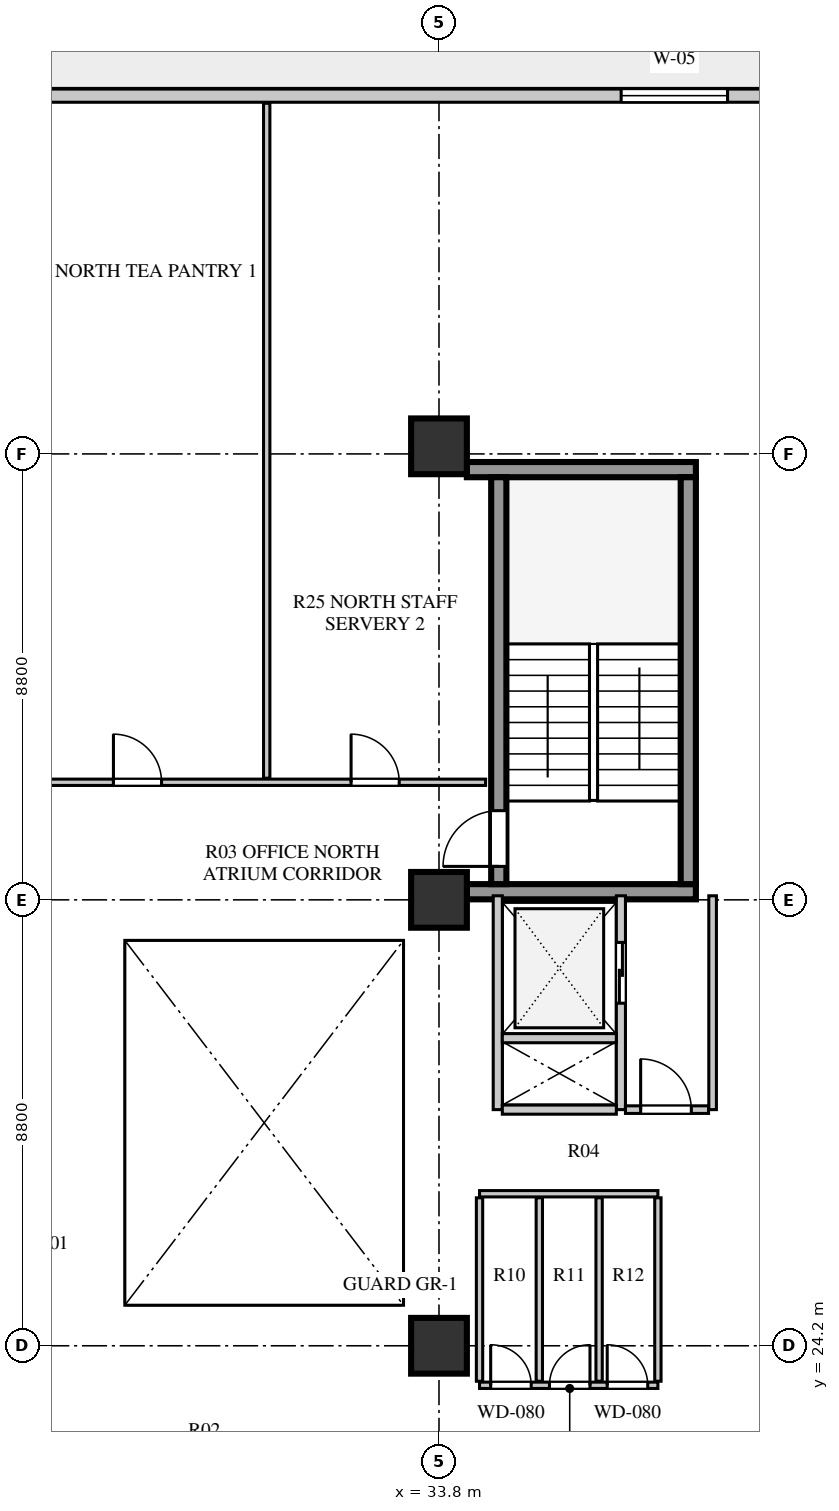
"""IFC4 building model, lengths in metres.
Left out: names, types, materials, properties, quantities, classifications, styles, units other than length and angle.
Written with IfcOpenShell. Run it as: python <this file> out.ifc"""

import sys

from ifc_helpers import new_model, si_unit, direction, frame, frame_2d, origin, origin_2d, place, context, subcontext, project, spatial, rectangle, extrude, element, fill, save


model = new_model("IFC4")
c1 = context("Model", 3, precision=1e-05, world=origin(), true_north=direction((0.0, 1.0)))
c2 = subcontext(c1, "Body", "Model", "MODEL_VIEW")
j1 = project(units=[si_unit("LENGTHUNIT", "METRE"), si_unit("PLANEANGLEUNIT", "RADIAN")], contexts=[c1])
p1 = place(None, origin())
s1 = spatial("IfcSite", under=j1, at=p1, CompositionType="ELEMENT")
p2 = place(p1, origin())
s2 = spatial("IfcBuilding", under=s1, at=p2, CompositionType="ELEMENT")
p3 = place(p2, frame((0.0, 0.0, 90.0)))
s3 = spatial("IfcBuildingStorey", under=s2, at=p3, CompositionType="ELEMENT", Elevation=90.0)
for number, where, z_axis, x_axis in (
    (1, (34.35, 33.16, 0.0), (0.0, 0.0, 1.0), (1.0, 0.0, 0.0)),
    (2, (34.35, 41.49, 0.0), (0.0, 0.0, 1.0), (1.0, 0.0, 0.0)),
):
    element("IfcWall", number, at=place(p3, frame(where, z_axis=z_axis, x_axis=x_axis)), inside=s3, PredefinedType="SHEAR", context=c2, shape_type="SweptSolid", body=[
        extrude(rectangle(XDim=4.52, YDim=0.3, at=frame_2d((2.26, 0.0))), origin(), (0.0, 0.0, 1.0), 3.7),
    ])
p4 = place(p3, frame((34.98, 33.31, 0.0), z_axis=(0.0, 0.0, 1.0), x_axis=(0.0, 1.0, 0.0)))
e3 = element("IfcWall", 3, at=p4, inside=s3, PredefinedType="SHEAR", context=c2, shape_type="SweptSolid", body=[
    extrude(rectangle(XDim=8.03, YDim=0.3, at=frame_2d((4.015, 0.0))), origin(), (0.0, 0.0, 1.0), 3.7),
])
p5 = place(p4, frame((0.35, 0.0, 0.0)))
e4 = element("IfcOpeningElement", 4, at=p5, cuts=e3, PredefinedType="OPENING", context=c2, shape_type="SweptSolid", body=[
    extrude(rectangle(XDim=1.1, YDim=2.1, at=frame_2d((0.55, 1.05))), frame((0.0, 0.16, 0.0), z_axis=(0.0, -1.0, 0.0), x_axis=(1.0, 0.0, 0.0)), (0.0, 0.0, 1.0), 0.32),
])
p6 = place(p3, frame((38.72, 33.31, 0.0), z_axis=(0.0, 0.0, 1.0), x_axis=(0.0, 1.0, 0.0)))
e5 = element("IfcWall", 5, at=p6, inside=s3, PredefinedType="SHEAR", context=c2, shape_type="SweptSolid", body=[
    extrude(rectangle(XDim=8.03, YDim=0.3, at=frame_2d((4.015, 0.0))), origin(), (0.0, 0.0, 1.0), 3.7),
])
for number, where, z_axis, x_axis in (
    (6, (33.8, 24.2, 0.0), (0.0, 0.0, 1.0), (1.0, 0.0, 0.0)),
    (7, (33.8, 33.0, 0.0), (0.0, 0.0, 1.0), (1.0, 0.0, 0.0)),
    (8, (33.8, 41.95, 0.0), (0.0, 0.0, 1.0), (1.0, 0.0, 0.0)),
):
    element("IfcColumn", number, at=place(p3, frame(where, z_axis=z_axis, x_axis=x_axis)), inside=s3, PredefinedType="COLUMN", context=c2, shape_type="SweptSolid", body=[
        extrude(rectangle(XDim=1.1, YDim=1.1, at=origin_2d()), origin(), (0.0, 0.0, 1.0), 3.7),
    ])
p7 = place(p3, frame((46.6, 48.87, 0.0), z_axis=(0.0, 0.0, 1.0), x_axis=(-1.0, 0.0, 0.0)))
e9 = element("IfcWall", 9, at=p7, inside=s3, PredefinedType="SOLIDWALL", context=c2, shape_type="SweptSolid", body=[
    extrude(rectangle(XDim=34.6, YDim=0.26, at=frame_2d((17.3, 0.0))), origin(), (0.0, 0.0, 1.0), 3.7),
])
p8 = place(p7, frame((32.65, 0.0, 0.0)))
e10 = element("IfcOpeningElement", 10, at=p8, cuts=e9, PredefinedType="OPENING", context=c2, shape_type="SweptSolid", body=[
    extrude(rectangle(XDim=1.0, YDim=2.05, at=frame_2d((0.5, 1.025))), frame((0.0, 0.14, 0.0), z_axis=(0.0, -1.0, 0.0), x_axis=(1.0, 0.0, 0.0)), (0.0, 0.0, 1.0), 0.28),
])
p9 = place(p7, frame((23.37, 0.0, 0.8)))
e11 = element("IfcOpeningElement", 11, at=p9, cuts=e9, PredefinedType="OPENING", context=c2, shape_type="SweptSolid", body=[
    extrude(rectangle(XDim=2.4, YDim=2.05, at=frame_2d((1.2, 1.025))), frame((0.0, 0.14, 0.0), z_axis=(0.0, -1.0, 0.0), x_axis=(1.0, 0.0, 0.0)), (0.0, 0.0, 1.0), 0.28),
])
p10 = place(p7, frame((7.105, 0.0, 0.8)))
e12 = element("IfcOpeningElement", 12, at=p10, cuts=e9, PredefinedType="OPENING", context=c2, shape_type="SweptSolid", body=[
    extrude(rectangle(XDim=2.1, YDim=1.95, at=frame_2d((1.05, 0.975))), frame((0.0, 0.14, 0.0), z_axis=(0.0, -1.0, 0.0), x_axis=(1.0, 0.0, 0.0)), (0.0, 0.0, 1.0), 0.28),
])
p11 = place(p3, frame((34.96, 28.86, 0.0), z_axis=(0.0, 0.0, 1.0), x_axis=(0.0, 1.0, 0.0)))
e13 = element("IfcWall", 13, at=p11, inside=s3, PredefinedType="SOLIDWALL", context=c2, shape_type="SweptSolid", body=[
    extrude(rectangle(XDim=4.22, YDim=0.18, at=frame_2d((2.11, 0.0))), origin(), (0.0, 0.0, 1.0), 3.7),
])
p12 = place(p3, frame((37.39, 28.86, 0.0), z_axis=(0.0, 0.0, 1.0), x_axis=(0.0, 1.0, 0.0)))
e14 = element("IfcWall", 14, at=p12, inside=s3, PredefinedType="SOLIDWALL", context=c2, shape_type="SweptSolid", body=[
    extrude(rectangle(XDim=4.22, YDim=0.18, at=frame_2d((2.11, 0.0))), origin(), (0.0, 0.0, 1.0), 3.7),
])
p13 = place(p12, frame((2.1, 0.0, 0.0)))
e15 = element("IfcOpeningElement", 15, at=p13, cuts=e14, PredefinedType="OPENING", context=c2, shape_type="SweptSolid", body=[
    extrude(rectangle(XDim=1.2, YDim=2.12, at=frame_2d((0.6, 1.06))), frame((0.0, 0.1, 0.0), z_axis=(0.0, -1.0, 0.0), x_axis=(1.0, 0.0, 0.0)), (0.0, 0.0, 1.0), 0.2),
])
for number, where, z_axis, x_axis in (
    (16, (35.05, 28.86, 0.0), (0.0, 0.0, 1.0), (1.0, 0.0, 0.0)),
    (17, (35.05, 30.27, 0.0), (0.0, 0.0, 1.0), (1.0, 0.0, 0.0)),
):
    element("IfcWall", number, at=place(p3, frame(where, z_axis=z_axis, x_axis=x_axis)), inside=s3, PredefinedType="SOLIDWALL", context=c2, shape_type="SweptSolid", body=[
        extrude(rectangle(XDim=2.25, YDim=0.18, at=frame_2d((1.125, 0.0))), origin(), (0.0, 0.0, 1.0), 3.7),
    ])
p14 = place(p3, frame((39.2, 28.86, 0.0), z_axis=(0.0, 0.0, 1.0), x_axis=(0.0, 1.0, 0.0)))
e18 = element("IfcWall", 18, at=p14, inside=s3, PredefinedType="PARTITIONING", context=c2, shape_type="SweptSolid", body=[
    extrude(rectangle(XDim=4.22, YDim=0.15, at=frame_2d((2.11, 0.0))), origin(), (0.0, 0.0, 1.0), 3.7),
])
p15 = place(p3, frame((37.48, 28.86, 0.0), z_axis=(0.0, 0.0, 1.0), x_axis=(1.0, 0.0, 0.0)))
e19 = element("IfcWall", 19, at=p15, inside=s3, PredefinedType="PARTITIONING", context=c2, shape_type="SweptSolid", body=[
    extrude(rectangle(XDim=1.64, YDim=0.15, at=frame_2d((0.82, 0.0))), origin(), (0.0, 0.0, 1.0), 3.7),
])
p16 = place(p15, frame((0.3, 0.0, 0.0)))
e20 = element("IfcOpeningElement", 20, at=p16, cuts=e19, PredefinedType="OPENING", context=c2, shape_type="SweptSolid", body=[
    extrude(rectangle(XDim=1.0, YDim=2.1, at=frame_2d((0.5, 1.05))), frame((0.0, 0.085, 0.0), z_axis=(0.0, -1.0, 0.0), x_axis=(1.0, 0.0, 0.0)), (0.0, 0.0, 1.0), 0.17),
])
p17 = place(p3, frame((34.6, 23.42, 0.0), z_axis=(0.0, 0.0, 1.0), x_axis=(1.0, 0.0, 0.0)))
e21 = element("IfcWall", 21, at=p17, inside=s3, PredefinedType="PLUMBINGWALL", context=c2, shape_type="SweptSolid", body=[
    extrude(rectangle(XDim=3.52, YDim=0.125, at=frame_2d((1.76, 0.0))), origin(), (0.0, 0.0, 1.0), 3.7),
])
p18 = place(p17, frame((0.22, 0.0, 0.0)))
e22 = element("IfcOpeningElement", 22, at=p18, cuts=e21, PredefinedType="OPENING", context=c2, shape_type="SweptSolid", body=[
    extrude(rectangle(XDim=0.8, YDim=2.05, at=frame_2d((0.4, 1.025))), frame((0.0, 0.073, 0.0), z_axis=(0.0, -1.0, 0.0), x_axis=(1.0, 0.0, 0.0)), (0.0, 0.0, 1.0), 0.145),
])
p19 = place(p17, frame((1.38, 0.0, 0.0)))
e23 = element("IfcOpeningElement", 23, at=p19, cuts=e21, PredefinedType="OPENING", context=c2, shape_type="SweptSolid", body=[
    extrude(rectangle(XDim=0.8, YDim=2.05, at=frame_2d((0.4, 1.025))), frame((0.0, 0.073, 0.0), z_axis=(0.0, -1.0, 0.0), x_axis=(1.0, 0.0, 0.0)), (0.0, 0.0, 1.0), 0.145),
])
p20 = place(p17, frame((2.52, 0.0, 0.0)))
e24 = element("IfcOpeningElement", 24, at=p20, cuts=e21, PredefinedType="OPENING", context=c2, shape_type="SweptSolid", body=[
    extrude(rectangle(XDim=0.8, YDim=2.05, at=frame_2d((0.4, 1.025))), frame((0.0, 0.073, 0.0), z_axis=(0.0, -1.0, 0.0), x_axis=(1.0, 0.0, 0.0)), (0.0, 0.0, 1.0), 0.145),
])
p21 = place(p3, frame((25.25, 35.32, 0.0), z_axis=(0.0, 0.0, 1.0), x_axis=(1.0, 0.0, 0.0)))
e25 = element("IfcWall", 25, at=p21, inside=s3, PredefinedType="PLUMBINGWALL", context=c2, shape_type="SweptSolid", body=[
    extrude(rectangle(XDim=9.47, YDim=0.125, at=frame_2d((4.735, 0.0))), origin(), (0.0, 0.0, 1.0), 3.7),
])
p22 = place(p21, frame((2.125, 0.0, 0.0)))
e26 = element("IfcOpeningElement", 26, at=p22, cuts=e25, PredefinedType="OPENING", context=c2, shape_type="SweptSolid", body=[
    extrude(rectangle(XDim=0.95, YDim=2.08, at=frame_2d((0.475, 1.04))), frame((0.0, 0.073, 0.0), z_axis=(0.0, -1.0, 0.0), x_axis=(1.0, 0.0, 0.0)), (0.0, 0.0, 1.0), 0.145),
])
p23 = place(p21, frame((6.815, 0.0, 0.0)))
e27 = element("IfcOpeningElement", 27, at=p23, cuts=e25, PredefinedType="OPENING", context=c2, shape_type="SweptSolid", body=[
    extrude(rectangle(XDim=0.95, YDim=2.08, at=frame_2d((0.475, 1.04))), frame((0.0, 0.073, 0.0), z_axis=(0.0, -1.0, 0.0), x_axis=(1.0, 0.0, 0.0)), (0.0, 0.0, 1.0), 0.145),
])
p24 = place(p3, frame((34.6, 27.2, 0.0), z_axis=(0.0, 0.0, 1.0), x_axis=(1.0, 0.0, 0.0)))
e28 = element("IfcWall", 28, at=p24, inside=s3, PredefinedType="PLUMBINGWALL", context=c2, shape_type="SweptSolid", body=[
    extrude(rectangle(XDim=3.52, YDim=0.125, at=frame_2d((1.76, 0.0))), origin(), (0.0, 0.0, 1.0), 3.3),
])
for number, where, z_axis, x_axis in (
    (29, (34.6, 23.5, 0.0), (0.0, 0.0, 1.0), (0.0, 1.0, 0.0)),
    (30, (38.12, 23.5, 0.0), (0.0, 0.0, 1.0), (0.0, 1.0, 0.0)),
    (31, (35.78, 23.5, 0.0), (0.0, 0.0, 1.0), (0.0, 1.0, 0.0)),
    (32, (36.96, 23.5, 0.0), (0.0, 0.0, 1.0), (0.0, 1.0, 0.0)),
):
    element("IfcWall", number, at=place(p3, frame(where, z_axis=z_axis, x_axis=x_axis)), inside=s3, PredefinedType="PLUMBINGWALL", context=c2, shape_type="SweptSolid", body=[
        extrude(rectangle(XDim=3.62, YDim=0.125, at=frame_2d((1.81, 0.0))), origin(), (0.0, 0.0, 1.0), 3.7),
    ])
p25 = place(p3, frame((30.4, 35.4, 0.0), z_axis=(0.0, 0.0, 1.0), x_axis=(0.0, 1.0, 0.0)))
e33 = element("IfcWall", 33, at=p25, inside=s3, PredefinedType="PLUMBINGWALL", context=c2, shape_type="SweptSolid", body=[
    extrude(rectangle(XDim=13.32, YDim=0.125, at=frame_2d((6.66, 0.0))), origin(), (0.0, 0.0, 1.0), 3.7),
])
p26 = place(p10, origin())
e34 = element("IfcWindow", 34, at=p26, inside=s3, PartitioningType="SINGLE_PANEL", PredefinedType="WINDOW", context=c2, shape_type="SweptSolid", body=[
    extrude(rectangle(XDim=2.1, YDim=1.95, at=frame_2d((1.05, 0.975))), frame((0.0, 0.03, 0.0), z_axis=(0.0, -1.0, 0.0), x_axis=(1.0, 0.0, 0.0)), (0.0, 0.0, 1.0), 0.06),
])
fill(e12, e34)
p27 = place(p5, origin())
e35 = element("IfcDoor", 35, at=p27, inside=s3, OperationType="SINGLE_SWING_LEFT", PredefinedType="DOOR", context=c2, shape_type="SweptSolid", body=[
    extrude(rectangle(XDim=1.1, YDim=2.1, at=frame_2d((0.55, 1.05))), frame((0.0, 0.025, 0.0), z_axis=(0.0, -1.0, 0.0), x_axis=(1.0, 0.0, 0.0)), (0.0, 0.0, 1.0), 0.05),
])
fill(e4, e35)
p28 = place(p13, frame((1.2, 0.0, 0.0), z_axis=(0.0, 0.0, 1.0), x_axis=(-1.0, 0.0, 0.0)))
e36 = element("IfcDoor", 36, at=p28, inside=s3, OperationType="DOUBLE_DOOR_SLIDING", PredefinedType="DOOR", context=c2, shape_type="SweptSolid", body=[
    extrude(rectangle(XDim=1.2, YDim=2.12, at=frame_2d((0.6, 1.06))), frame((0.0, 0.025, 0.0), z_axis=(0.0, -1.0, 0.0), x_axis=(1.0, 0.0, 0.0)), (0.0, 0.0, 1.0), 0.05),
])
fill(e15, e36)
p29 = place(p16, origin())
e37 = element("IfcDoor", 37, at=p29, inside=s3, OperationType="SINGLE_SWING_LEFT", PredefinedType="DOOR", context=c2, shape_type="SweptSolid", body=[
    extrude(rectangle(XDim=1.0, YDim=2.1, at=frame_2d((0.5, 1.05))), frame((0.0, 0.025, 0.0), z_axis=(0.0, -1.0, 0.0), x_axis=(1.0, 0.0, 0.0)), (0.0, 0.0, 1.0), 0.05),
])
fill(e20, e37)
p30 = place(p18, origin())
e38 = element("IfcDoor", 38, at=p30, inside=s3, OperationType="SINGLE_SWING_LEFT", PredefinedType="DOOR", context=c2, shape_type="SweptSolid", body=[
    extrude(rectangle(XDim=0.8, YDim=2.05, at=frame_2d((0.4, 1.025))), frame((0.0, 0.025, 0.0), z_axis=(0.0, -1.0, 0.0), x_axis=(1.0, 0.0, 0.0)), (0.0, 0.0, 1.0), 0.05),
])
fill(e22, e38)
p31 = place(p19, origin())
e39 = element("IfcDoor", 39, at=p31, inside=s3, OperationType="SINGLE_SWING_RIGHT", PredefinedType="DOOR", context=c2, shape_type="SweptSolid", body=[
    extrude(rectangle(XDim=0.8, YDim=2.05, at=frame_2d((0.4, 1.025))), frame((0.0, 0.025, 0.0), z_axis=(0.0, -1.0, 0.0), x_axis=(1.0, 0.0, 0.0)), (0.0, 0.0, 1.0), 0.05),
])
fill(e23, e39)
p32 = place(p20, origin())
e40 = element("IfcDoor", 40, at=p32, inside=s3, OperationType="SINGLE_SWING_LEFT", PredefinedType="DOOR", context=c2, shape_type="SweptSolid", body=[
    extrude(rectangle(XDim=0.8, YDim=2.05, at=frame_2d((0.4, 1.025))), frame((0.0, 0.025, 0.0), z_axis=(0.0, -1.0, 0.0), x_axis=(1.0, 0.0, 0.0)), (0.0, 0.0, 1.0), 0.05),
])
fill(e24, e40)
p33 = place(p22, origin())
e41 = element("IfcDoor", 41, at=p33, inside=s3, OperationType="SINGLE_SWING_LEFT", PredefinedType="DOOR", context=c2, shape_type="SweptSolid", body=[
    extrude(rectangle(XDim=0.95, YDim=2.08, at=frame_2d((0.475, 1.04))), frame((0.0, 0.025, 0.0), z_axis=(0.0, -1.0, 0.0), x_axis=(1.0, 0.0, 0.0)), (0.0, 0.0, 1.0), 0.05),
])
fill(e26, e41)
p34 = place(p23, origin())
e42 = element("IfcDoor", 42, at=p34, inside=s3, OperationType="SINGLE_SWING_LEFT", PredefinedType="DOOR", context=c2, shape_type="SweptSolid", body=[
    extrude(rectangle(XDim=0.95, YDim=2.08, at=frame_2d((0.475, 1.04))), frame((0.0, 0.025, 0.0), z_axis=(0.0, -1.0, 0.0), x_axis=(1.0, 0.0, 0.0)), (0.0, 0.0, 1.0), 0.05),
])
fill(e27, e42)
save(model, sys.argv[1])
